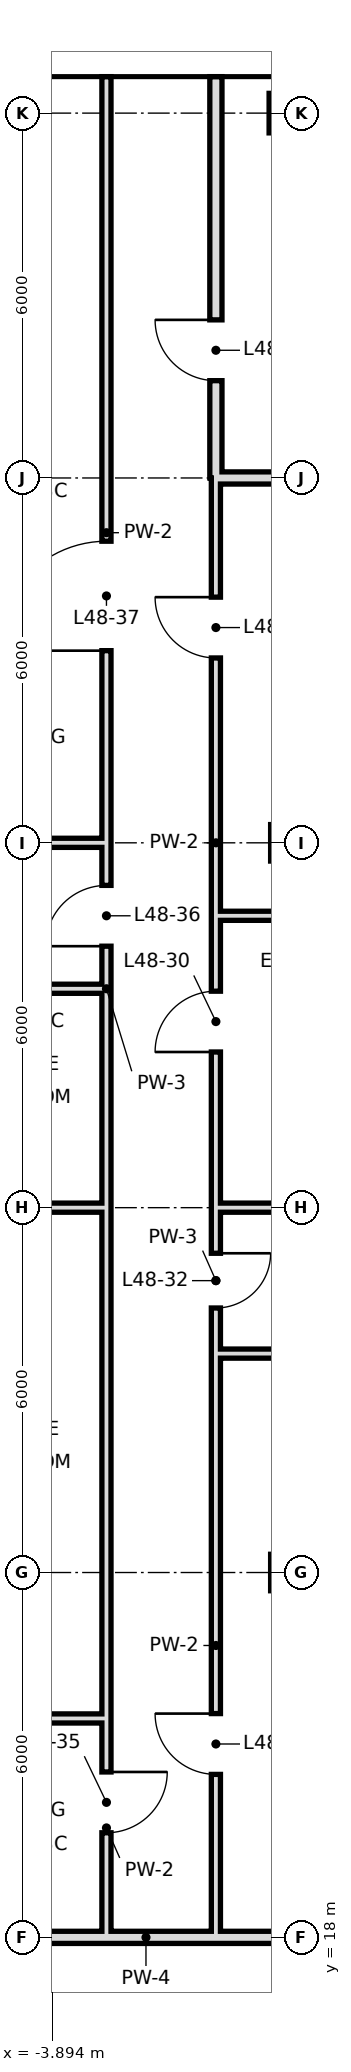
"""IFC4 building model, lengths in metres.
Left out: names, types, materials, properties, quantities, classifications, styles, units other than length and angle.
Written with IfcOpenShell. Run it as: python <this file> out.ifc"""

import sys

from ifc_helpers import new_model, si_unit, direction, frame, frame_2d, origin, origin_2d, place, context, subcontext, project, spatial, rectangle, hollow_rectangle, extrude, element, fill, save


model = new_model("IFC4")
c1 = context("Model", 3, precision=1e-05, world=origin(), true_north=direction((0.0, 1.0)))
c2 = subcontext(c1, "Body", "Model", "MODEL_VIEW")
j1 = project(units=[si_unit("LENGTHUNIT", "METRE"), si_unit("PLANEANGLEUNIT", "RADIAN")], contexts=[c1])
p1 = place(None, origin())
s1 = spatial("IfcSite", under=j1, at=p1, CompositionType="ELEMENT")
p2 = place(p1, origin())
s2 = spatial("IfcBuilding", under=s1, at=p2, CompositionType="ELEMENT")
p3 = place(p2, frame((0.0, 0.0, 206.4)))
s3 = spatial("IfcBuildingStorey", under=s2, at=p3, CompositionType="ELEMENT", Elevation=206.4)
p4 = place(p3, frame((0.0, 48.0, 0.0), z_axis=(0.0, 0.0, 1.0), x_axis=(1.0, 0.0, 0.0)))
e1 = element("IfcColumn", 1, at=p4, inside=s3, PredefinedType="COLUMN", context=c2, shape_type="SweptSolid", body=[
    extrude(hollow_rectangle(XDim=0.65, YDim=0.65, WallThickness=0.032, at=origin_2d()), origin(), (0.0, 0.0, 1.0), 3.6),
])
p5 = place(p3, frame((-1.2, 42.0, 0.0), z_axis=(0.0, 0.0, 1.0), x_axis=(0.0, 1.0, 0.0)))
e2 = element("IfcWall", 2, at=p5, inside=s3, PredefinedType="SOLIDWALL", context=c2, shape_type="SweptSolid", body=[
    extrude(rectangle(XDim=6.6, YDim=0.2, at=frame_2d((3.3, 0.0))), origin(), (0.0, 0.0, 1.0), 2.68),
])
p6 = place(p5, frame((1.6, 0.0, 0.0)))
e3 = element("IfcOpeningElement", 3, at=p6, cuts=e2, PredefinedType="OPENING", context=c2, shape_type="SweptSolid", body=[
    extrude(rectangle(XDim=1.0, YDim=2.4, at=frame_2d((0.5, 1.2))), frame((0.0, 0.11, 0.0), z_axis=(0.0, -1.0, 0.0), x_axis=(1.0, 0.0, 0.0)), (0.0, 0.0, 1.0), 0.22),
])
p7 = place(p3, frame((-1.2, 18.0, 0.0), z_axis=(0.0, 0.0, 1.0), x_axis=(0.0, 1.0, 0.0)))
e4 = element("IfcWall", 4, at=p7, inside=s3, PredefinedType="PARTITIONING", context=c2, shape_type="SweptSolid", body=[
    extrude(rectangle(XDim=9.6, YDim=0.15, at=frame_2d((4.8, 0.0))), origin(), (0.0, 0.0, 1.0), 3.38),
])
p8 = place(p7, frame((2.68, 0.0, 0.0)))
e5 = element("IfcOpeningElement", 5, at=p8, cuts=e4, PredefinedType="OPENING", context=c2, shape_type="SweptSolid", body=[
    extrude(rectangle(XDim=1.0, YDim=2.4, at=frame_2d((0.5, 1.2))), frame((0.0, 0.085, 0.0), z_axis=(0.0, -1.0, 0.0), x_axis=(1.0, 0.0, 0.0)), (0.0, 0.0, 1.0), 0.17),
])
p9 = place(p3, frame((-1.2, 30.0, 0.0), z_axis=(0.0, 0.0, 1.0), x_axis=(0.0, 1.0, 0.0)))
e6 = element("IfcWall", 6, at=p9, inside=s3, PredefinedType="PARTITIONING", context=c2, shape_type="SweptSolid", body=[
    extrude(rectangle(XDim=12.0, YDim=0.15, at=frame_2d((6.0, 0.0))), origin(), (0.0, 0.0, 1.0), 3.38),
])
p10 = place(p9, frame((2.56, 0.0, 0.0)))
e7 = element("IfcOpeningElement", 7, at=p10, cuts=e6, PredefinedType="OPENING", context=c2, shape_type="SweptSolid", body=[
    extrude(rectangle(XDim=1.0, YDim=2.4, at=frame_2d((0.5, 1.2))), frame((0.0, 0.085, 0.0), z_axis=(0.0, -1.0, 0.0), x_axis=(1.0, 0.0, 0.0)), (0.0, 0.0, 1.0), 0.17),
])
p11 = place(p9, frame((9.04, 0.0, 0.0)))
e8 = element("IfcOpeningElement", 8, at=p11, cuts=e6, PredefinedType="OPENING", context=c2, shape_type="SweptSolid", body=[
    extrude(rectangle(XDim=1.0, YDim=2.4, at=frame_2d((0.5, 1.2))), frame((0.0, 0.085, 0.0), z_axis=(0.0, -1.0, 0.0), x_axis=(1.0, 0.0, 0.0)), (0.0, 0.0, 1.0), 0.17),
])
p12 = place(p3, frame((-1.2, 27.6, 0.0), z_axis=(0.0, 0.0, 1.0), x_axis=(0.0, 1.0, 0.0)))
e9 = element("IfcWall", 9, at=p12, inside=s3, PredefinedType="PARTITIONING", context=c2, shape_type="SweptSolid", body=[
    extrude(rectangle(XDim=2.4, YDim=0.15, at=frame_2d((1.2, 0.0))), origin(), (0.0, 0.0, 1.0), 3.38),
])
p13 = place(p12, frame((0.75, 0.0, 0.0)))
e10 = element("IfcOpeningElement", 10, at=p13, cuts=e9, PredefinedType="OPENING", context=c2, shape_type="SweptSolid", body=[
    extrude(rectangle(XDim=0.9, YDim=2.4, at=frame_2d((0.45, 1.2))), frame((0.0, 0.085, 0.0), z_axis=(0.0, -1.0, 0.0), x_axis=(1.0, 0.0, 0.0)), (0.0, 0.0, 1.0), 0.17),
])
p14 = place(p3, frame((-3.0, 18.0, 0.0), z_axis=(0.0, 0.0, 1.0), x_axis=(0.0, 1.0, 0.0)))
e11 = element("IfcWall", 11, at=p14, inside=s3, PredefinedType="PARTITIONING", context=c2, shape_type="SweptSolid", body=[
    extrude(rectangle(XDim=3.6, YDim=0.15, at=frame_2d((1.8, 0.0))), origin(), (0.0, 0.0, 1.0), 3.38),
])
p15 = place(p14, frame((1.72, 0.0, 0.0)))
e12 = element("IfcOpeningElement", 12, at=p15, cuts=e11, PredefinedType="OPENING", context=c2, shape_type="SweptSolid", body=[
    extrude(rectangle(XDim=1.0, YDim=2.4, at=frame_2d((0.5, 1.2))), frame((0.0, 0.085, 0.0), z_axis=(0.0, -1.0, 0.0), x_axis=(1.0, 0.0, 0.0)), (0.0, 0.0, 1.0), 0.17),
])
p16 = place(p3, frame((-3.0, 33.6, 0.0), z_axis=(0.0, 0.0, 1.0), x_axis=(0.0, 1.0, 0.0)))
e13 = element("IfcWall", 13, at=p16, inside=s3, PredefinedType="PARTITIONING", context=c2, shape_type="SweptSolid", body=[
    extrude(rectangle(XDim=15.0, YDim=0.15, at=frame_2d((7.5, 0.0))), origin(), (0.0, 0.0, 1.0), 3.38),
])
p17 = place(p16, frame((0.7, 0.0, 0.0)))
e14 = element("IfcOpeningElement", 14, at=p17, cuts=e13, PredefinedType="OPENING", context=c2, shape_type="SweptSolid", body=[
    extrude(rectangle(XDim=1.0, YDim=2.4, at=frame_2d((0.5, 1.2))), frame((0.0, 0.085, 0.0), z_axis=(0.0, -1.0, 0.0), x_axis=(1.0, 0.0, 0.0)), (0.0, 0.0, 1.0), 0.17),
])
p18 = place(p16, frame((5.56, 0.0, 0.0)))
e15 = element("IfcOpeningElement", 15, at=p18, cuts=e13, PredefinedType="OPENING", context=c2, shape_type="SweptSolid", body=[
    extrude(rectangle(XDim=1.8, YDim=2.4, at=frame_2d((0.9, 1.2))), frame((0.0, 0.085, 0.0), z_axis=(0.0, -1.0, 0.0), x_axis=(1.0, 0.0, 0.0)), (0.0, 0.0, 1.0), 0.17),
])
p19 = place(p3, frame((-3.0, 21.6, 0.0), z_axis=(0.0, 0.0, 1.0), x_axis=(0.0, 1.0, 0.0)))
e16 = element("IfcWall", 16, at=p19, inside=s3, PredefinedType="PARTITIONING", context=c2, shape_type="SweptSolid", body=[
    extrude(rectangle(XDim=12.0, YDim=0.15, at=frame_2d((6.0, 0.0))), origin(), (0.0, 0.0, 1.0), 3.38),
])
p20 = place(p3, frame((-7.8, 18.0, 0.0), z_axis=(0.0, 0.0, 1.0), x_axis=(1.0, 0.0, 0.0)))
e17 = element("IfcWall", 17, at=p20, inside=s3, PredefinedType="SOLIDWALL", context=c2, shape_type="SweptSolid", body=[
    extrude(rectangle(XDim=10.9, YDim=0.2, at=frame_2d((5.45, 0.0))), origin(), (0.0, 0.0, 1.0), 2.68),
])
p21 = place(p3, frame((-6.0, 21.6, 0.0), z_axis=(0.0, 0.0, 1.0), x_axis=(1.0, 0.0, 0.0)))
e18 = element("IfcWall", 18, at=p21, inside=s3, PredefinedType="PARTITIONING", context=c2, shape_type="SweptSolid", body=[
    extrude(rectangle(XDim=3.0, YDim=0.15, at=frame_2d((1.5, 0.0))), origin(), (0.0, 0.0, 1.0), 3.38),
])
p22 = place(p3, frame((-1.2, 27.6, 0.0), z_axis=(0.0, 0.0, 1.0), x_axis=(1.0, 0.0, 0.0)))
e19 = element("IfcWall", 19, at=p22, inside=s3, PredefinedType="PARTITIONING", context=c2, shape_type="SweptSolid", body=[
    extrude(rectangle(XDim=4.3, YDim=0.15, at=frame_2d((2.15, 0.0))), origin(), (0.0, 0.0, 1.0), 3.38),
])
p23 = place(p3, frame((-6.0, 30.0, 0.0), z_axis=(0.0, 0.0, 1.0), x_axis=(1.0, 0.0, 0.0)))
e20 = element("IfcWall", 20, at=p23, inside=s3, PredefinedType="PARTITIONING", context=c2, shape_type="SweptSolid", body=[
    extrude(rectangle(XDim=3.0, YDim=0.15, at=frame_2d((1.5, 0.0))), origin(), (0.0, 0.0, 1.0), 2.68),
])
p24 = place(p3, frame((-1.2, 30.0, 0.0), z_axis=(0.0, 0.0, 1.0), x_axis=(1.0, 0.0, 0.0)))
e21 = element("IfcWall", 21, at=p24, inside=s3, PredefinedType="PARTITIONING", context=c2, shape_type="SweptSolid", body=[
    extrude(rectangle(XDim=4.3, YDim=0.15, at=frame_2d((2.15, 0.0))), origin(), (0.0, 0.0, 1.0), 2.68),
])
p25 = place(p3, frame((-6.0, 33.6, 0.0), z_axis=(0.0, 0.0, 1.0), x_axis=(1.0, 0.0, 0.0)))
e22 = element("IfcWall", 22, at=p25, inside=s3, PredefinedType="PARTITIONING", context=c2, shape_type="SweptSolid", body=[
    extrude(rectangle(XDim=3.0, YDim=0.15, at=frame_2d((1.5, 0.0))), origin(), (0.0, 0.0, 1.0), 3.38),
])
p26 = place(p3, frame((-1.2, 34.8, 0.0), z_axis=(0.0, 0.0, 1.0), x_axis=(1.0, 0.0, 0.0)))
e23 = element("IfcWall", 23, at=p26, inside=s3, PredefinedType="PARTITIONING", context=c2, shape_type="SweptSolid", body=[
    extrude(rectangle(XDim=4.3, YDim=0.15, at=frame_2d((2.15, 0.0))), origin(), (0.0, 0.0, 1.0), 3.38),
])
p27 = place(p3, frame((-12.0, 36.0, 0.0), z_axis=(0.0, 0.0, 1.0), x_axis=(1.0, 0.0, 0.0)))
e24 = element("IfcWall", 24, at=p27, inside=s3, PredefinedType="PARTITIONING", context=c2, shape_type="SweptSolid", body=[
    extrude(rectangle(XDim=9.0, YDim=0.15, at=frame_2d((4.5, 0.0))), origin(), (0.0, 0.0, 1.0), 2.68),
])
p28 = place(p3, frame((-1.2, 42.0, 0.0), z_axis=(0.0, 0.0, 1.0), x_axis=(1.0, 0.0, 0.0)))
e25 = element("IfcWall", 25, at=p28, inside=s3, PredefinedType="SOLIDWALL", context=c2, shape_type="SweptSolid", body=[
    extrude(rectangle(XDim=4.3, YDim=0.2, at=frame_2d((2.15, 0.0))), origin(), (0.0, 0.0, 1.0), 2.68),
])
p29 = place(p10, origin())
e26 = element("IfcDoor", 26, at=p29, inside=s3, OperationType="SINGLE_SWING_LEFT", PredefinedType="DOOR", context=c2, shape_type="SweptSolid", body=[
    extrude(rectangle(XDim=1.0, YDim=2.4, at=frame_2d((0.5, 1.2))), frame((0.0, 0.025, 0.0), z_axis=(0.0, -1.0, 0.0), x_axis=(1.0, 0.0, 0.0)), (0.0, 0.0, 1.0), 0.05),
])
fill(e7, e26)
p30 = place(p8, frame((1.0, 0.0, 0.0), z_axis=(0.0, 0.0, 1.0), x_axis=(-1.0, 0.0, 0.0)))
e27 = element("IfcDoor", 27, at=p30, inside=s3, OperationType="SINGLE_SWING_LEFT", PredefinedType="DOOR", context=c2, shape_type="SweptSolid", body=[
    extrude(rectangle(XDim=1.0, YDim=2.4, at=frame_2d((0.5, 1.2))), frame((0.0, 0.025, 0.0), z_axis=(0.0, -1.0, 0.0), x_axis=(1.0, 0.0, 0.0)), (0.0, 0.0, 1.0), 0.05),
])
fill(e5, e27)
p31 = place(p13, origin())
e28 = element("IfcDoor", 28, at=p31, inside=s3, OperationType="SINGLE_SWING_RIGHT", PredefinedType="DOOR", context=c2, shape_type="SweptSolid", body=[
    extrude(rectangle(XDim=0.9, YDim=2.4, at=frame_2d((0.45, 1.2))), frame((0.0, 0.025, 0.0), z_axis=(0.0, -1.0, 0.0), x_axis=(1.0, 0.0, 0.0)), (0.0, 0.0, 1.0), 0.05),
])
fill(e10, e28)
p32 = place(p11, frame((1.0, 0.0, 0.0), z_axis=(0.0, 0.0, 1.0), x_axis=(-1.0, 0.0, 0.0)))
e29 = element("IfcDoor", 29, at=p32, inside=s3, OperationType="SINGLE_SWING_LEFT", PredefinedType="DOOR", context=c2, shape_type="SweptSolid", body=[
    extrude(rectangle(XDim=1.0, YDim=2.4, at=frame_2d((0.5, 1.2))), frame((0.0, 0.025, 0.0), z_axis=(0.0, -1.0, 0.0), x_axis=(1.0, 0.0, 0.0)), (0.0, 0.0, 1.0), 0.05),
])
fill(e8, e29)
p33 = place(p6, frame((1.0, 0.0, 0.0), z_axis=(0.0, 0.0, 1.0), x_axis=(-1.0, 0.0, 0.0)))
e30 = element("IfcDoor", 30, at=p33, inside=s3, OperationType="SINGLE_SWING_LEFT", PredefinedType="DOOR", context=c2, shape_type="SweptSolid", body=[
    extrude(rectangle(XDim=1.0, YDim=2.4, at=frame_2d((0.5, 1.2))), frame((0.0, 0.025, 0.0), z_axis=(0.0, -1.0, 0.0), x_axis=(1.0, 0.0, 0.0)), (0.0, 0.0, 1.0), 0.05),
])
fill(e3, e30)
p34 = place(p15, origin())
e31 = element("IfcDoor", 31, at=p34, inside=s3, OperationType="SINGLE_SWING_RIGHT", PredefinedType="DOOR", context=c2, shape_type="SweptSolid", body=[
    extrude(rectangle(XDim=1.0, YDim=2.4, at=frame_2d((0.5, 1.2))), frame((0.0, 0.025, 0.0), z_axis=(0.0, -1.0, 0.0), x_axis=(1.0, 0.0, 0.0)), (0.0, 0.0, 1.0), 0.05),
])
fill(e12, e31)
p35 = place(p17, origin())
e32 = element("IfcDoor", 32, at=p35, inside=s3, OperationType="SINGLE_SWING_LEFT", PredefinedType="DOOR", context=c2, shape_type="SweptSolid", body=[
    extrude(rectangle(XDim=1.0, YDim=2.4, at=frame_2d((0.5, 1.2))), frame((0.0, 0.025, 0.0), z_axis=(0.0, -1.0, 0.0), x_axis=(1.0, 0.0, 0.0)), (0.0, 0.0, 1.0), 0.05),
])
fill(e14, e32)
p36 = place(p18, origin())
e33 = element("IfcDoor", 33, at=p36, inside=s3, OperationType="SINGLE_SWING_LEFT", PredefinedType="DOOR", context=c2, shape_type="SweptSolid", body=[
    extrude(rectangle(XDim=1.8, YDim=2.4, at=frame_2d((0.9, 1.2))), frame((0.0, 0.025, 0.0), z_axis=(0.0, -1.0, 0.0), x_axis=(1.0, 0.0, 0.0)), (0.0, 0.0, 1.0), 0.05),
])
fill(e15, e33)
save(model, sys.argv[1])
